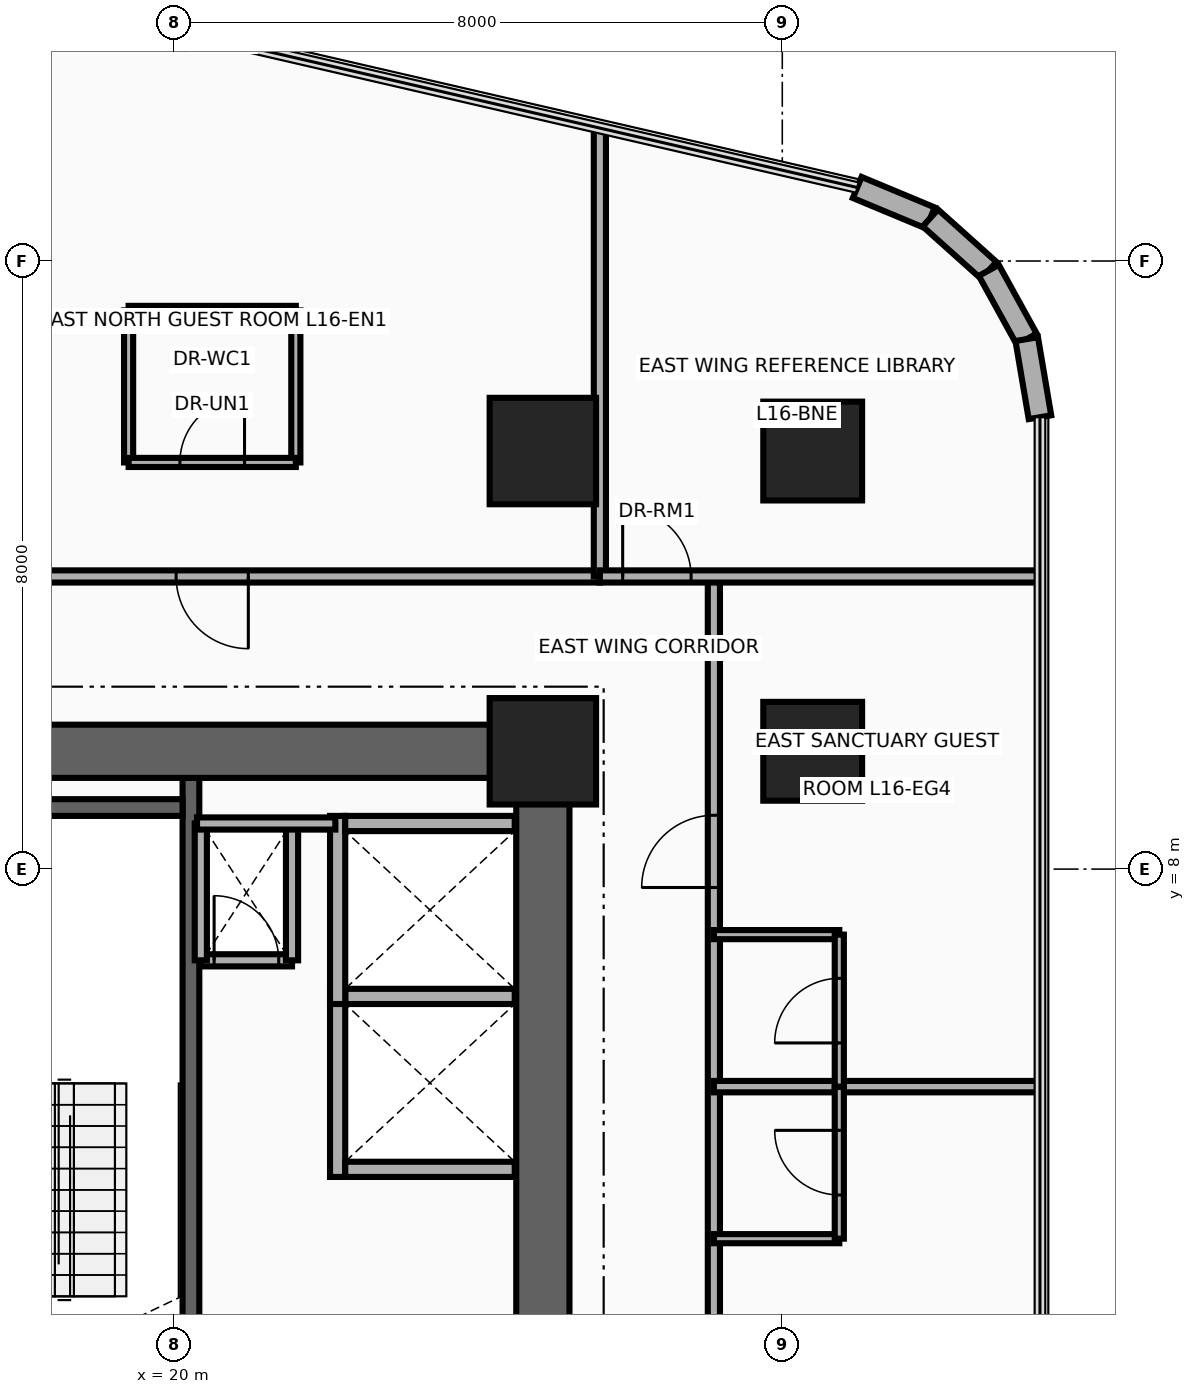
"""IFC4 building model, lengths in metres.
Left out: names, types, materials, properties, quantities, classifications, styles, units other than length and angle.
Written with IfcOpenShell. Run it as: python <this file> out.ifc"""

import sys

from ifc_helpers import new_model, si_unit, direction, frame, frame_2d, origin, origin_2d, place, context, subcontext, project, spatial, rectangle, circle, extrude, source, transform, mapped, element, fill, save


model = new_model("IFC4")
c1 = context("Model", 3, precision=1e-05, world=origin(), true_north=direction((0.0, 1.0)))
c2 = subcontext(c1, "Body", "Model", "MODEL_VIEW")
j1 = project(units=[si_unit("LENGTHUNIT", "METRE"), si_unit("PLANEANGLEUNIT", "RADIAN")], contexts=[c1])
p1 = place(None, origin())
s1 = spatial("IfcSite", under=j1, at=p1, CompositionType="ELEMENT")
p2 = place(p1, origin())
s2 = spatial("IfcBuilding", under=s1, at=p2, CompositionType="ELEMENT")
p3 = place(p2, frame((0.0, 0.0, 66.7)))
s3 = spatial("IfcBuildingStorey", under=s2, at=p3, CompositionType="ELEMENT", Elevation=66.7)
p4 = place(p3, frame((20.22, 0.68, 0.0), z_axis=(0.0, 0.0, 1.0), x_axis=(0.0, 1.0, 0.0)))
e1 = element("IfcWall", 1, at=p4, inside=s3, PredefinedType="SHEAR", context=c2, shape_type="SweptSolid", body=[
    extrude(rectangle(XDim=8.52, YDim=0.22, at=frame_2d((4.26, 0.0))), origin(), (0.0, 0.0, 1.0), 3.46),
])
p5 = place(p3, frame((17.0, 8.81, 0.0), z_axis=(0.0, 0.0, 1.0), x_axis=(1.0, 0.0, 0.0)))
e2 = element("IfcWall", 2, at=p5, inside=s3, PredefinedType="SHEAR", context=c2, shape_type="SweptSolid", body=[
    extrude(rectangle(XDim=3.11, YDim=0.22, at=frame_2d((1.555, 0.0))), origin(), (0.0, 0.0, 1.0), 3.46),
])
p6 = place(p3, frame((24.85, 0.95, 0.0), z_axis=(0.0, 0.0, 1.0), x_axis=(0.0, 1.0, 0.0)))
e3 = element("IfcWall", 3, at=p6, inside=s3, PredefinedType="SHEAR", context=c2, shape_type="SweptSolid", body=[
    extrude(rectangle(XDim=8.95, YDim=0.7, at=frame_2d((4.475, 0.0))), origin(), (0.0, 0.0, 1.0), 3.46),
])
p7 = place(p3, frame((15.85, 9.55, 0.0), z_axis=(0.0, 0.0, 1.0), x_axis=(1.0, 0.0, 0.0)))
e4 = element("IfcWall", 4, at=p7, inside=s3, PredefinedType="SHEAR", context=c2, shape_type="SweptSolid", body=[
    extrude(rectangle(XDim=9.0, YDim=0.7, at=frame_2d((4.5, 0.0))), origin(), (0.0, 0.0, 1.0), 3.46),
])
m1 = source(origin(), c2, "Body", "SweptSolid", [
    extrude(rectangle(XDim=1.4, YDim=1.4, at=origin_2d()), origin(), (0.0, 0.0, 1.0), 3.7),
])
p8 = place(p3, frame((24.85, 9.55, 0.0), z_axis=(0.0, 0.0, 1.0), x_axis=(1.0, 0.0, 0.0)))
e5 = element("IfcColumn", 5, at=p8, inside=s3, PredefinedType="COLUMN", context=c2, shape_type="MappedRepresentation", body=[
    mapped(m1, transform((0.0, 0.0, 0.0), x_axis=(1.0, 0.0, 0.0), y_axis=(0.0, 1.0, 0.0), z_axis=(0.0, 0.0, 1.0), scale=1.0)),
])
m2 = source(origin(), c2, "Body", "SweptSolid", [
    extrude(circle(Radius=0.65, at=origin_2d()), origin(), (0.0, 0.0, 1.0), 3.7),
])
p9 = place(p3, frame((28.4, 9.55, 0.0), z_axis=(0.0, 0.0, 1.0), x_axis=(1.0, 0.0, 0.0)))
e6 = element("IfcColumn", 6, at=p9, inside=s3, PredefinedType="COLUMN", context=c2, shape_type="MappedRepresentation", body=[
    mapped(m2, transform((0.0, 0.0, 0.0), x_axis=(1.0, 0.0, 0.0), y_axis=(0.0, 1.0, 0.0), z_axis=(0.0, 0.0, 1.0), scale=1.0)),
])
p10 = place(p3, frame((24.85, 13.5, 0.0), z_axis=(0.0, 0.0, 1.0), x_axis=(1.0, 0.0, 0.0)))
e7 = element("IfcColumn", 7, at=p10, inside=s3, PredefinedType="COLUMN", context=c2, shape_type="MappedRepresentation", body=[
    mapped(m1, transform((0.0, 0.0, 0.0), x_axis=(1.0, 0.0, 0.0), y_axis=(0.0, 1.0, 0.0), z_axis=(0.0, 0.0, 1.0), scale=1.0)),
])
p11 = place(p3, frame((28.4, 13.5, 0.0), z_axis=(0.0, 0.0, 1.0), x_axis=(1.0, 0.0, 0.0)))
e8 = element("IfcColumn", 8, at=p11, inside=s3, PredefinedType="COLUMN", context=c2, shape_type="MappedRepresentation", body=[
    mapped(m2, transform((0.0, 0.0, 0.0), x_axis=(1.0, 0.0, 0.0), y_axis=(0.0, 1.0, 0.0), z_axis=(0.0, 0.0, 1.0), scale=1.0)),
])
p12 = place(p3, frame((28.986, 16.967, 0.0), z_axis=(0.0, 0.0, 1.0), x_axis=(0.923083852684, -0.384598753136, 0.0)))
e9 = element("IfcWall", 9, at=p12, inside=s3, PredefinedType="SOLIDWALL", context=c2, shape_type="SweptSolid", body=[
    extrude(rectangle(XDim=1.042, YDim=0.3, at=frame_2d((0.521, 0.0))), origin(), (0.0, 0.0, 1.0), 3.46),
])
p13 = place(p3, frame((29.948, 16.566, 0.0), z_axis=(0.0, 0.0, 1.0), x_axis=(0.744585645533, -0.66752694063, 0.0)))
e10 = element("IfcWall", 10, at=p13, inside=s3, PredefinedType="SOLIDWALL", context=c2, shape_type="SweptSolid", body=[
    extrude(rectangle(XDim=1.033, YDim=0.3, at=frame_2d((0.517, 0.0))), origin(), (0.0, 0.0, 1.0), 3.46),
])
p14 = place(p3, frame((30.717, 15.877, 0.0), z_axis=(0.0, 0.0, 1.0), x_axis=(0.482971098131, -0.875636293429, 0.0)))
e11 = element("IfcWall", 11, at=p14, inside=s3, PredefinedType="SOLIDWALL", context=c2, shape_type="SweptSolid", body=[
    extrude(rectangle(XDim=1.033, YDim=0.3, at=frame_2d((0.516, 0.0))), origin(), (0.0, 0.0, 1.0), 3.46),
])
p15 = place(p3, frame((31.216, 14.973, 0.0), z_axis=(0.0, 0.0, 1.0), x_axis=(0.167019462117, -0.985953598946, 0.0)))
e12 = element("IfcWall", 12, at=p15, inside=s3, PredefinedType="SOLIDWALL", context=c2, shape_type="SweptSolid", body=[
    extrude(rectangle(XDim=1.042, YDim=0.3, at=frame_2d((0.521, 0.0))), origin(), (0.0, 0.0, 1.0), 3.46),
])
p16 = place(p3, frame((22.15, 3.95, 0.0), z_axis=(0.0, 0.0, 1.0), x_axis=(0.0, 1.0, 0.0)))
e13 = element("IfcWall", 13, at=p16, inside=s3, PredefinedType="MOVABLE", context=c2, shape_type="SweptSolid", body=[
    extrude(rectangle(XDim=2.475, YDim=0.2, at=frame_2d((1.238, 0.0))), origin(), (0.0, 0.0, 1.0), 3.46),
])
for number, where, z_axis, x_axis in (
    (14, (22.25, 4.05, 0.0), (0.0, 0.0, 1.0), (1.0, 0.0, 0.0)),
    (15, (22.25, 6.325, 0.0), (0.0, 0.0, 1.0), (1.0, 0.0, 0.0)),
):
    element("IfcWall", number, at=place(p3, frame(where, z_axis=z_axis, x_axis=x_axis)), inside=s3, PredefinedType="MOVABLE", context=c2, shape_type="SweptSolid", body=[
        extrude(rectangle(XDim=2.23, YDim=0.2, at=frame_2d((1.115, 0.0))), origin(), (0.0, 0.0, 1.0), 2.245),
    ])
p17 = place(p3, frame((22.15, 6.225, 0.0), z_axis=(0.0, 0.0, 1.0), x_axis=(0.0, 1.0, 0.0)))
e16 = element("IfcWall", 16, at=p17, inside=s3, PredefinedType="MOVABLE", context=c2, shape_type="SweptSolid", body=[
    extrude(rectangle(XDim=2.475, YDim=0.2, at=frame_2d((1.237, 0.0))), origin(), (0.0, 0.0, 1.0), 3.46),
])
p18 = place(p3, frame((22.25, 8.6, 0.0), z_axis=(0.0, 0.0, 1.0), x_axis=(1.0, 0.0, 0.0)))
e17 = element("IfcWall", 17, at=p18, inside=s3, PredefinedType="MOVABLE", context=c2, shape_type="SweptSolid", body=[
    extrude(rectangle(XDim=2.23, YDim=0.2, at=frame_2d((1.115, 0.0))), origin(), (0.0, 0.0, 1.0), 2.245),
])
p19 = place(p3, frame((20.35, 6.8, 0.0), z_axis=(0.0, 0.0, 1.0), x_axis=(1.0, 0.0, 0.0)))
e18 = element("IfcWall", 18, at=p19, inside=s3, PredefinedType="PARTITIONING", context=c2, shape_type="SweptSolid", body=[
    extrude(rectangle(XDim=1.2, YDim=0.16, at=frame_2d((0.6, 0.0))), origin(), (0.0, 0.0, 1.0), 3.46),
])
p20 = place(p19, frame((0.175, 0.0, 0.0)))
e19 = element("IfcOpeningElement", 19, at=p20, cuts=e18, PredefinedType="OPENING", context=c2, shape_type="SweptSolid", body=[
    extrude(rectangle(XDim=0.85, YDim=2.05, at=frame_2d((0.425, 1.025))), frame((0.0, 0.095, 0.0), z_axis=(0.0, -1.0, 0.0), x_axis=(1.0, 0.0, 0.0)), (0.0, 0.0, 1.0), 0.19),
])
for number, where, z_axis, x_axis in (
    (20, (21.55, 6.8, 0.0), (0.0, 0.0, 1.0), (0.0, 1.0, 0.0)),
    (21, (20.35, 6.8, 0.0), (0.0, 0.0, 1.0), (0.0, 1.0, 0.0)),
):
    element("IfcWall", number, at=place(p3, frame(where, z_axis=z_axis, x_axis=x_axis)), inside=s3, PredefinedType="PARTITIONING", context=c2, shape_type="SweptSolid", body=[
        extrude(rectangle(XDim=1.8, YDim=0.16, at=frame_2d((0.9, 0.0))), origin(), (0.0, 0.0, 1.0), 3.46),
    ])
p21 = place(p3, frame((20.3, 8.6, 0.0), z_axis=(0.0, 0.0, 1.0), x_axis=(1.0, 0.0, 0.0)))
e22 = element("IfcWall", 22, at=p21, inside=s3, PredefinedType="PARTITIONING", context=c2, shape_type="SweptSolid", body=[
    extrude(rectangle(XDim=1.82, YDim=0.16, at=frame_2d((0.91, 0.0))), origin(), (0.0, 0.0, 1.0), 3.46),
])
p22 = place(p3, frame((15.4, 11.85, 0.0), z_axis=(0.0, 0.0, 1.0), x_axis=(1.0, 0.0, 0.0)))
e23 = element("IfcWall", 23, at=p22, inside=s3, PredefinedType="PARTITIONING", context=c2, shape_type="SweptSolid", body=[
    extrude(rectangle(XDim=10.2, YDim=0.16, at=frame_2d((5.1, 0.0))), origin(), (0.0, 0.0, 1.0), 2.834),
])
p23 = place(p22, frame((4.625, 0.0, 0.0)))
e24 = element("IfcOpeningElement", 24, at=p23, cuts=e23, PredefinedType="OPENING", context=c2, shape_type="SweptSolid", body=[
    extrude(rectangle(XDim=0.95, YDim=2.15, at=frame_2d((0.475, 1.075))), frame((0.0, 0.095, 0.0), z_axis=(0.0, -1.0, 0.0), x_axis=(1.0, 0.0, 0.0)), (0.0, 0.0, 1.0), 0.19),
])
p24 = place(p3, frame((25.6, 11.85, 0.0), z_axis=(0.0, 0.0, 1.0), x_axis=(0.0, 1.0, 0.0)))
e25 = element("IfcWall", 25, at=p24, inside=s3, PredefinedType="PARTITIONING", context=c2, shape_type="SweptSolid", body=[
    extrude(rectangle(XDim=5.898, YDim=0.16, at=frame_2d((2.949, 0.0))), origin(), (0.0, 0.0, 1.0), 2.583),
])
for number, where, z_axis, x_axis in (
    (26, (19.4, 13.35, 0.0), (0.0, 0.0, 1.0), (0.0, 1.0, 0.0)),
    (27, (21.6, 13.35, 0.0), (0.0, 0.0, 1.0), (0.0, 1.0, 0.0)),
):
    element("IfcWall", number, at=place(p3, frame(where, z_axis=z_axis, x_axis=x_axis)), inside=s3, PredefinedType="PARTITIONING", context=c2, shape_type="SweptSolid", body=[
        extrude(rectangle(XDim=2.0, YDim=0.12, at=frame_2d((1.0, 0.0))), origin(), (0.0, 0.0, 1.0), 2.583),
    ])
p25 = place(p3, frame((19.4, 15.35, 0.0), z_axis=(0.0, 0.0, 1.0), x_axis=(1.0, 0.0, 0.0)))
e28 = element("IfcWall", 28, at=p25, inside=s3, PredefinedType="PARTITIONING", context=c2, shape_type="SweptSolid", body=[
    extrude(rectangle(XDim=2.2, YDim=0.12, at=frame_2d((1.1, 0.0))), origin(), (0.0, 0.0, 1.0), 3.46),
])
p26 = place(p3, frame((19.4, 13.35, 0.0), z_axis=(0.0, 0.0, 1.0), x_axis=(1.0, 0.0, 0.0)))
e29 = element("IfcWall", 29, at=p26, inside=s3, PredefinedType="PARTITIONING", context=c2, shape_type="SweptSolid", body=[
    extrude(rectangle(XDim=2.2, YDim=0.12, at=frame_2d((1.1, 0.0))), origin(), (0.0, 0.0, 1.0), 2.583),
])
p27 = place(p26, frame((0.675, 0.0, 0.0)))
e30 = element("IfcOpeningElement", 30, at=p27, cuts=e29, PredefinedType="OPENING", context=c2, shape_type="SweptSolid", body=[
    extrude(rectangle(XDim=0.85, YDim=2.1, at=frame_2d((0.425, 1.05))), frame((0.0, 0.075, 0.0), z_axis=(0.0, -1.0, 0.0), x_axis=(1.0, 0.0, 0.0)), (0.0, 0.0, 1.0), 0.15),
])
p28 = place(p3, frame((27.1, -13.89, 0.0), z_axis=(0.0, 0.0, 1.0), x_axis=(0.0, 1.0, 0.0)))
e31 = element("IfcWall", 31, at=p28, inside=s3, PredefinedType="PARTITIONING", context=c2, shape_type="SweptSolid", body=[
    extrude(rectangle(XDim=25.74, YDim=0.16, at=frame_2d((12.87, 0.0))), origin(), (0.0, 0.0, 1.0), 2.583),
])
p29 = place(p28, frame((2.62, 0.0, 0.0)))
e32 = element("IfcOpeningElement", 32, at=p29, cuts=e31, PredefinedType="OPENING", context=c2, shape_type="SweptSolid", body=[
    extrude(rectangle(XDim=0.95, YDim=2.15, at=frame_2d((0.475, 1.075))), frame((0.0, 0.095, 0.0), z_axis=(0.0, -1.0, 0.0), x_axis=(1.0, 0.0, 0.0)), (0.0, 0.0, 1.0), 0.19),
])
p30 = place(p28, frame((8.484, 0.0, 0.0)))
e33 = element("IfcOpeningElement", 33, at=p30, cuts=e31, PredefinedType="OPENING", context=c2, shape_type="SweptSolid", body=[
    extrude(rectangle(XDim=0.95, YDim=2.15, at=frame_2d((0.475, 1.075))), frame((0.0, 0.095, 0.0), z_axis=(0.0, -1.0, 0.0), x_axis=(1.0, 0.0, 0.0)), (0.0, 0.0, 1.0), 0.19),
])
p31 = place(p28, frame((14.197, 0.0, 0.0)))
e34 = element("IfcOpeningElement", 34, at=p31, cuts=e31, PredefinedType="OPENING", context=c2, shape_type="SweptSolid", body=[
    extrude(rectangle(XDim=0.95, YDim=2.15, at=frame_2d((0.475, 1.075))), frame((0.0, 0.095, 0.0), z_axis=(0.0, -1.0, 0.0), x_axis=(1.0, 0.0, 0.0)), (0.0, 0.0, 1.0), 0.19),
])
p32 = place(p28, frame((21.648, 0.0, 0.0)))
e35 = element("IfcOpeningElement", 35, at=p32, cuts=e31, PredefinedType="OPENING", context=c2, shape_type="SweptSolid", body=[
    extrude(rectangle(XDim=0.95, YDim=2.15, at=frame_2d((0.475, 1.075))), frame((0.0, 0.095, 0.0), z_axis=(0.0, -1.0, 0.0), x_axis=(1.0, 0.0, 0.0)), (0.0, 0.0, 1.0), 0.19),
])
p33 = place(p3, frame((25.6, 11.85, 0.0), z_axis=(0.0, 0.0, 1.0), x_axis=(1.0, 0.0, 0.0)))
e36 = element("IfcWall", 36, at=p33, inside=s3, PredefinedType="PARTITIONING", context=c2, shape_type="SweptSolid", body=[
    extrude(rectangle(XDim=5.79, YDim=0.16, at=frame_2d((2.895, 0.0))), origin(), (0.0, 0.0, 1.0), 2.896),
])
p34 = place(p33, frame((0.3, 0.0, 0.0)))
e37 = element("IfcOpeningElement", 37, at=p34, cuts=e36, PredefinedType="OPENING", context=c2, shape_type="SweptSolid", body=[
    extrude(rectangle(XDim=0.9, YDim=2.1, at=frame_2d((0.45, 1.05))), frame((0.0, 0.095, 0.0), z_axis=(0.0, -1.0, 0.0), x_axis=(1.0, 0.0, 0.0)), (0.0, 0.0, 1.0), 0.19),
])
p35 = place(p3, frame((27.1, 5.138, 0.0), z_axis=(0.0, 0.0, 1.0), x_axis=(1.0, 0.0, 0.0)))
e38 = element("IfcWall", 38, at=p35, inside=s3, PredefinedType="PARTITIONING", context=c2, shape_type="SweptSolid", body=[
    extrude(rectangle(XDim=4.29, YDim=0.15, at=frame_2d((2.145, 0.0))), origin(), (0.0, 0.0, 1.0), 2.896),
])
p36 = place(p3, frame((27.1, 3.138, 0.0), z_axis=(0.0, 0.0, 1.0), x_axis=(1.0, 0.0, 0.0)))
e39 = element("IfcWall", 39, at=p36, inside=s3, PredefinedType="PARTITIONING", context=c2, shape_type="SweptSolid", body=[
    extrude(rectangle(XDim=1.65, YDim=0.12, at=frame_2d((0.825, 0.0))), origin(), (0.0, 0.0, 1.0), 2.896),
])
p37 = place(p3, frame((28.75, 3.138, 0.0), z_axis=(0.0, 0.0, 1.0), x_axis=(0.0, 1.0, 0.0)))
e40 = element("IfcWall", 40, at=p37, inside=s3, PredefinedType="PARTITIONING", context=c2, shape_type="SweptSolid", body=[
    extrude(rectangle(XDim=2.0, YDim=0.12, at=frame_2d((1.0, 0.0))), origin(), (0.0, 0.0, 1.0), 3.46),
])
p38 = place(p37, frame((0.575, 0.0, 0.0)))
e41 = element("IfcOpeningElement", 41, at=p38, cuts=e40, PredefinedType="OPENING", context=c2, shape_type="SweptSolid", body=[
    extrude(rectangle(XDim=0.85, YDim=2.1, at=frame_2d((0.425, 1.05))), frame((0.0, 0.075, 0.0), z_axis=(0.0, -1.0, 0.0), x_axis=(1.0, 0.0, 0.0)), (0.0, 0.0, 1.0), 0.15),
])
p39 = place(p3, frame((27.1, 7.138, 0.0), z_axis=(0.0, 0.0, 1.0), x_axis=(1.0, 0.0, 0.0)))
e42 = element("IfcWall", 42, at=p39, inside=s3, PredefinedType="PARTITIONING", context=c2, shape_type="SweptSolid", body=[
    extrude(rectangle(XDim=1.65, YDim=0.12, at=frame_2d((0.825, 0.0))), origin(), (0.0, 0.0, 1.0), 2.896),
])
p40 = place(p3, frame((28.75, 5.138, 0.0), z_axis=(0.0, 0.0, 1.0), x_axis=(0.0, 1.0, 0.0)))
e43 = element("IfcWall", 43, at=p40, inside=s3, PredefinedType="PARTITIONING", context=c2, shape_type="SweptSolid", body=[
    extrude(rectangle(XDim=2.0, YDim=0.12, at=frame_2d((1.0, 0.0))), origin(), (0.0, 0.0, 1.0), 3.46),
])
p41 = place(p40, frame((0.575, 0.0, 0.0)))
e44 = element("IfcOpeningElement", 44, at=p41, cuts=e43, PredefinedType="OPENING", context=c2, shape_type="SweptSolid", body=[
    extrude(rectangle(XDim=0.85, YDim=2.1, at=frame_2d((0.425, 1.05))), frame((0.0, 0.075, 0.0), z_axis=(0.0, -1.0, 0.0), x_axis=(1.0, 0.0, 0.0)), (0.0, 0.0, 1.0), 0.15),
])
p42 = place(p20, origin())
e45 = element("IfcDoor", 45, at=p42, inside=s3, OperationType="SINGLE_SWING_RIGHT", PredefinedType="DOOR", context=c2, shape_type="SweptSolid", body=[
    extrude(rectangle(XDim=0.85, YDim=2.05, at=frame_2d((0.425, 1.025))), frame((0.0, 0.025, 0.0), z_axis=(0.0, -1.0, 0.0), x_axis=(1.0, 0.0, 0.0)), (0.0, 0.0, 1.0), 0.05),
])
fill(e19, e45)
p43 = place(p23, frame((0.95, 0.0, 0.0), z_axis=(0.0, 0.0, 1.0), x_axis=(-1.0, 0.0, 0.0)))
e46 = element("IfcDoor", 46, at=p43, inside=s3, OperationType="SINGLE_SWING_LEFT", PredefinedType="DOOR", context=c2, shape_type="SweptSolid", body=[
    extrude(rectangle(XDim=0.95, YDim=2.15, at=frame_2d((0.475, 1.075))), frame((0.0, 0.025, 0.0), z_axis=(0.0, -1.0, 0.0), x_axis=(1.0, 0.0, 0.0)), (0.0, 0.0, 1.0), 0.05),
])
fill(e24, e46)
p44 = place(p27, origin())
e47 = element("IfcDoor", 47, at=p44, inside=s3, OperationType="SINGLE_SWING_RIGHT", PredefinedType="DOOR", context=c2, shape_type="SweptSolid", body=[
    extrude(rectangle(XDim=0.85, YDim=2.1, at=frame_2d((0.425, 1.05))), frame((0.0, 0.025, 0.0), z_axis=(0.0, -1.0, 0.0), x_axis=(1.0, 0.0, 0.0)), (0.0, 0.0, 1.0), 0.05),
])
fill(e30, e47)
p45 = place(p34, origin())
e48 = element("IfcDoor", 48, at=p45, inside=s3, OperationType="SINGLE_SWING_LEFT", PredefinedType="DOOR", context=c2, shape_type="SweptSolid", body=[
    extrude(rectangle(XDim=0.9, YDim=2.1, at=frame_2d((0.45, 1.05))), frame((0.0, 0.025, 0.0), z_axis=(0.0, -1.0, 0.0), x_axis=(1.0, 0.0, 0.0)), (0.0, 0.0, 1.0), 0.05),
])
fill(e37, e48)
p46 = place(p38, origin())
e49 = element("IfcDoor", 49, at=p46, inside=s3, OperationType="SINGLE_SWING_LEFT", PredefinedType="DOOR", context=c2, shape_type="SweptSolid", body=[
    extrude(rectangle(XDim=0.85, YDim=2.1, at=frame_2d((0.425, 1.05))), frame((0.0, 0.025, 0.0), z_axis=(0.0, -1.0, 0.0), x_axis=(1.0, 0.0, 0.0)), (0.0, 0.0, 1.0), 0.05),
])
fill(e41, e49)
p47 = place(p32, origin())
e50 = element("IfcDoor", 50, at=p47, inside=s3, OperationType="SINGLE_SWING_RIGHT", PredefinedType="DOOR", context=c2, shape_type="SweptSolid", body=[
    extrude(rectangle(XDim=0.95, YDim=2.15, at=frame_2d((0.475, 1.075))), frame((0.0, 0.025, 0.0), z_axis=(0.0, -1.0, 0.0), x_axis=(1.0, 0.0, 0.0)), (0.0, 0.0, 1.0), 0.05),
])
fill(e35, e50)
p48 = place(p41, origin())
e51 = element("IfcDoor", 51, at=p48, inside=s3, OperationType="SINGLE_SWING_LEFT", PredefinedType="DOOR", context=c2, shape_type="SweptSolid", body=[
    extrude(rectangle(XDim=0.85, YDim=2.1, at=frame_2d((0.425, 1.05))), frame((0.0, 0.025, 0.0), z_axis=(0.0, -1.0, 0.0), x_axis=(1.0, 0.0, 0.0)), (0.0, 0.0, 1.0), 0.05),
])
fill(e44, e51)
save(model, sys.argv[1])
